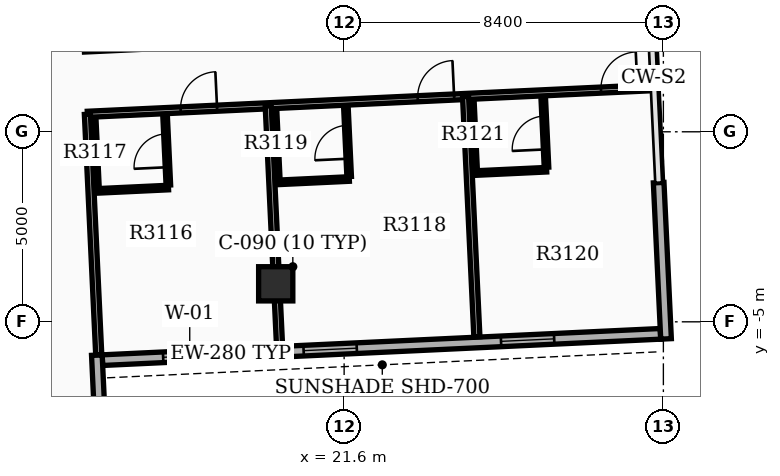
"""IFC4 building model, lengths in metres.
Left out: names, types, materials, properties, quantities, classifications, styles, units other than length and angle.
Written with IfcOpenShell. Run it as: python <this file> out.ifc"""

import sys

from ifc_helpers import new_model, si_unit, direction, frame, frame_2d, origin, origin_2d, place, context, subcontext, project, spatial, rectangle, extrude, element, fill, save


model = new_model("IFC4")
c1 = context("Model", 3, precision=1e-05, world=origin(), true_north=direction((0.0, 1.0)))
c2 = subcontext(c1, "Body", "Model", "MODEL_VIEW")
j1 = project(units=[si_unit("LENGTHUNIT", "METRE"), si_unit("PLANEANGLEUNIT", "RADIAN")], contexts=[c1])
p1 = place(None, origin())
s1 = spatial("IfcSite", under=j1, at=p1, CompositionType="ELEMENT")
p2 = place(p1, origin())
s2 = spatial("IfcBuilding", under=s1, at=p2, CompositionType="ELEMENT")
p3 = place(p2, frame((0.0, 0.0, 196.8)))
s3 = spatial("IfcBuildingStorey", under=s2, at=p3, CompositionType="ELEMENT", Elevation=196.8)
p4 = place(p3, frame((19.8, -4.0, 0.0), z_axis=(0.0, 0.0, 1.0), x_axis=(1.0, 0.0, 0.0)))
e1 = element("IfcColumn", 1, at=p4, inside=s3, PredefinedType="COLUMN", context=c2, shape_type="SweptSolid", body=[
    extrude(rectangle(XDim=0.9, YDim=0.9, at=origin_2d()), origin(), (0.0, 0.0, 1.0), 4.5),
])
p5 = place(p3, frame((15.24, -6.009, 0.0), z_axis=(0.0, 0.0, 1.0), x_axis=(0.998890124275, 0.047101163748, 0.0)))
e2 = element("IfcWall", 2, at=p5, inside=s3, PredefinedType="STANDARD", context=c2, shape_type="SweptSolid", body=[
    extrude(rectangle(XDim=14.7, YDim=0.28, at=frame_2d((7.35, 0.0))), origin(), (0.0, 0.0, 1.0), 3.38),
])
p6 = place(p5, frame((1.6, 0.0, 0.8)))
e3 = element("IfcOpeningElement", 3, at=p6, cuts=e2, PredefinedType="OPENING", context=c2, shape_type="SweptSolid", body=[
    extrude(rectangle(XDim=1.4, YDim=1.6, at=frame_2d((0.7, 0.8))), frame((0.0, 0.15, 0.0), z_axis=(0.0, -1.0, 0.0), x_axis=(1.0, 0.0, 0.0)), (0.0, 0.0, 1.0), 0.3),
])
p7 = place(p5, frame((5.3, 0.0, 0.8)))
e4 = element("IfcOpeningElement", 4, at=p7, cuts=e2, PredefinedType="OPENING", context=c2, shape_type="SweptSolid", body=[
    extrude(rectangle(XDim=1.4, YDim=1.6, at=frame_2d((0.7, 0.8))), frame((0.0, 0.15, 0.0), z_axis=(0.0, -1.0, 0.0), x_axis=(1.0, 0.0, 0.0)), (0.0, 0.0, 1.0), 0.3),
])
p8 = place(p5, frame((10.5, 0.0, 0.8)))
e5 = element("IfcOpeningElement", 5, at=p8, cuts=e2, PredefinedType="OPENING", context=c2, shape_type="SweptSolid", body=[
    extrude(rectangle(XDim=1.4, YDim=1.6, at=frame_2d((0.7, 0.8))), frame((0.0, 0.15, 0.0), z_axis=(0.0, -1.0, 0.0), x_axis=(1.0, 0.0, 0.0)), (0.0, 0.0, 1.0), 0.3),
])
p9 = place(p3, frame((30.07, -5.45, 0.0), z_axis=(0.0, 0.0, 1.0), x_axis=(-0.047094531617, 0.998890436981, 0.0)))
e6 = element("IfcWall", 6, at=p9, inside=s3, PredefinedType="STANDARD", context=c2, shape_type="SweptSolid", body=[
    extrude(rectangle(XDim=4.116, YDim=0.28, at=frame_2d((2.058, 0.0))), origin(), (0.0, 0.0, 1.0), 3.38),
])
p10 = place(p3, frame((15.094, -5.875, 0.0), z_axis=(0.0, 0.0, 1.0), x_axis=(0.04712043756, -0.998889215261, 0.0)))
e7 = element("IfcWall", 7, at=p10, inside=s3, PredefinedType="STANDARD", context=c2, shape_type="SweptSolid", body=[
    extrude(rectangle(XDim=6.86, YDim=0.28, at=frame_2d((3.43, 0.0))), origin(), (0.0, 0.0, 1.0), 3.38),
])
p11 = place(p3, frame((14.845, 0.46, 0.0), z_axis=(0.0, 0.0, 1.0), x_axis=(0.998889676925, 0.047110649891, 0.0)))
e8 = element("IfcWall", 8, at=p11, inside=s3, PredefinedType="PARTITIONING", context=c2, shape_type="SweptSolid", body=[
    extrude(rectangle(XDim=14.93, YDim=0.16, at=frame_2d((7.465, 0.0))), origin(), (0.0, 0.0, 1.0), 3.37),
])
p12 = place(p11, frame((2.456, 0.0, 0.0)))
e9 = element("IfcOpeningElement", 9, at=p12, cuts=e8, PredefinedType="OPENING", context=c2, shape_type="SweptSolid", body=[
    extrude(rectangle(XDim=0.96, YDim=2.15, at=frame_2d((0.48, 1.075))), frame((0.0, 0.09, 0.0), z_axis=(0.0, -1.0, 0.0), x_axis=(1.0, 0.0, 0.0)), (0.0, 0.0, 1.0), 0.18),
])
p13 = place(p11, frame((8.701, 0.0, 0.0)))
e10 = element("IfcOpeningElement", 10, at=p13, cuts=e8, PredefinedType="OPENING", context=c2, shape_type="SweptSolid", body=[
    extrude(rectangle(XDim=0.96, YDim=2.15, at=frame_2d((0.48, 1.075))), frame((0.0, 0.09, 0.0), z_axis=(0.0, -1.0, 0.0), x_axis=(1.0, 0.0, 0.0)), (0.0, 0.0, 1.0), 0.18),
])
p14 = place(p11, frame((13.53, 0.0, 0.0)))
e11 = element("IfcOpeningElement", 11, at=p14, cuts=e8, PredefinedType="OPENING", context=c2, shape_type="SweptSolid", body=[
    extrude(rectangle(XDim=0.96, YDim=2.15, at=frame_2d((0.48, 1.075))), frame((0.0, 0.09, 0.0), z_axis=(0.0, -1.0, 0.0), x_axis=(1.0, 0.0, 0.0)), (0.0, 0.0, 1.0), 0.18),
])
for number, where, z_axis, x_axis in (
    (12, (14.845, 0.46, 0.0), (0.0, 0.0, 1.0), (0.047, -0.999, 0.0)),
    (13, (19.603, 0.684, 0.0), (0.0, 0.0, 1.0), (0.047, -0.999, 0.0)),
):
    element("IfcWall", number, at=place(p3, frame(where, z_axis=z_axis, x_axis=x_axis)), inside=s3, PredefinedType="PARTITIONING", context=c2, shape_type="SweptSolid", body=[
        extrude(rectangle(XDim=6.332, YDim=0.16, at=frame_2d((3.166, 0.0))), origin(), (0.0, 0.0, 1.0), 3.37),
    ])
p15 = place(p3, frame((16.975, -1.402, 0.0), z_axis=(0.0, 0.0, 1.0), x_axis=(-0.047087116047, 0.998890786574, 0.0)))
e14 = element("IfcWall", 14, at=p15, inside=s3, PredefinedType="PARTITIONING", context=c2, shape_type="SweptSolid", body=[
    extrude(rectangle(XDim=1.82, YDim=0.12, at=frame_2d((0.91, 0.0))), origin(), (0.0, 0.0, 1.0), 3.37),
])
p16 = place(p15, frame((0.47, 0.0, 0.0)))
e15 = element("IfcOpeningElement", 15, at=p16, cuts=e14, PredefinedType="OPENING", context=c2, shape_type="SweptSolid", body=[
    extrude(rectangle(XDim=0.88, YDim=2.1, at=frame_2d((0.44, 1.05))), frame((0.0, 0.07, 0.0), z_axis=(0.0, -1.0, 0.0), x_axis=(1.0, 0.0, 0.0)), (0.0, 0.0, 1.0), 0.14),
])
p17 = place(p3, frame((15.097, -1.49, 0.0), z_axis=(0.0, 0.0, 1.0), x_axis=(-0.047087116047, 0.998890786574, 0.0)))
e16 = element("IfcWall", 16, at=p17, inside=s3, PredefinedType="PARTITIONING", context=c2, shape_type="SweptSolid", body=[
    extrude(rectangle(XDim=1.82, YDim=0.12, at=frame_2d((0.91, 0.0))), origin(), (0.0, 0.0, 1.0), 3.37),
])
p18 = place(p3, frame((15.1, -1.555, 0.0), z_axis=(0.0, 0.0, 1.0), x_axis=(0.998888030748, 0.047145540913, 0.0)))
e17 = element("IfcWall", 17, at=p18, inside=s3, PredefinedType="PARTITIONING", context=c2, shape_type="SweptSolid", body=[
    extrude(rectangle(XDim=1.88, YDim=0.12, at=frame_2d((0.94, 0.0))), origin(), (0.0, 0.0, 1.0), 3.37),
])
p19 = place(p3, frame((24.795, 0.929, 0.0), z_axis=(0.0, 0.0, 1.0), x_axis=(0.047077862468, -0.998891222739, 0.0)))
e18 = element("IfcWall", 18, at=p19, inside=s3, PredefinedType="PARTITIONING", context=c2, shape_type="SweptSolid", body=[
    extrude(rectangle(XDim=6.332, YDim=0.16, at=frame_2d((3.166, 0.0))), origin(), (0.0, 0.0, 1.0), 3.37),
])
p20 = place(p3, frame((21.733, -1.177, 0.0), z_axis=(0.0, 0.0, 1.0), x_axis=(-0.047087116047, 0.998890786574, 0.0)))
e19 = element("IfcWall", 19, at=p20, inside=s3, PredefinedType="PARTITIONING", context=c2, shape_type="SweptSolid", body=[
    extrude(rectangle(XDim=1.82, YDim=0.12, at=frame_2d((0.91, 0.0))), origin(), (0.0, 0.0, 1.0), 3.37),
])
p21 = place(p20, frame((0.47, 0.0, 0.0)))
e20 = element("IfcOpeningElement", 20, at=p21, cuts=e19, PredefinedType="OPENING", context=c2, shape_type="SweptSolid", body=[
    extrude(rectangle(XDim=0.88, YDim=2.1, at=frame_2d((0.44, 1.05))), frame((0.0, 0.07, 0.0), z_axis=(0.0, -1.0, 0.0), x_axis=(1.0, 0.0, 0.0)), (0.0, 0.0, 1.0), 0.14),
])
p22 = place(p3, frame((19.855, -1.266, 0.0), z_axis=(0.0, 0.0, 1.0), x_axis=(-0.047214641863, 0.998884766924, 0.0)))
e21 = element("IfcWall", 21, at=p22, inside=s3, PredefinedType="PARTITIONING", context=c2, shape_type="SweptSolid", body=[
    extrude(rectangle(XDim=1.82, YDim=0.12, at=frame_2d((0.91, 0.0))), origin(), (0.0, 0.0, 1.0), 3.37),
])
p23 = place(p3, frame((19.858, -1.331, 0.0), z_axis=(0.0, 0.0, 1.0), x_axis=(0.998888319371, 0.047139425368, 0.0)))
e22 = element("IfcWall", 22, at=p23, inside=s3, PredefinedType="PARTITIONING", context=c2, shape_type="SweptSolid", body=[
    extrude(rectangle(XDim=1.88, YDim=0.12, at=frame_2d((0.94, 0.0))), origin(), (0.0, 0.0, 1.0), 3.37),
])
p24 = place(p3, frame((26.925, -0.933, 0.0), z_axis=(0.0, 0.0, 1.0), x_axis=(-0.047087116047, 0.998890786574, 0.0)))
e23 = element("IfcWall", 23, at=p24, inside=s3, PredefinedType="PARTITIONING", context=c2, shape_type="SweptSolid", body=[
    extrude(rectangle(XDim=1.82, YDim=0.12, at=frame_2d((0.91, 0.0))), origin(), (0.0, 0.0, 1.0), 3.37),
])
p25 = place(p24, frame((0.47, 0.0, 0.0)))
e24 = element("IfcOpeningElement", 24, at=p25, cuts=e23, PredefinedType="OPENING", context=c2, shape_type="SweptSolid", body=[
    extrude(rectangle(XDim=0.88, YDim=2.1, at=frame_2d((0.44, 1.05))), frame((0.0, 0.07, 0.0), z_axis=(0.0, -1.0, 0.0), x_axis=(1.0, 0.0, 0.0)), (0.0, 0.0, 1.0), 0.14),
])
p26 = place(p3, frame((25.047, -1.021, 0.0), z_axis=(0.0, 0.0, 1.0), x_axis=(-0.047087116047, 0.998890786574, 0.0)))
e25 = element("IfcWall", 25, at=p26, inside=s3, PredefinedType="PARTITIONING", context=c2, shape_type="SweptSolid", body=[
    extrude(rectangle(XDim=1.82, YDim=0.12, at=frame_2d((0.91, 0.0))), origin(), (0.0, 0.0, 1.0), 3.37),
])
p27 = place(p3, frame((25.05, -1.086, 0.0), z_axis=(0.0, 0.0, 1.0), x_axis=(0.998888319371, 0.047139425368, 0.0)))
e26 = element("IfcWall", 26, at=p27, inside=s3, PredefinedType="PARTITIONING", context=c2, shape_type="SweptSolid", body=[
    extrude(rectangle(XDim=1.88, YDim=0.12, at=frame_2d((0.94, 0.0))), origin(), (0.0, 0.0, 1.0), 3.37),
])
p28 = place(p6, origin())
e27 = element("IfcWindow", 27, at=p28, inside=s3, PartitioningType="SINGLE_PANEL", PredefinedType="WINDOW", context=c2, shape_type="SweptSolid", body=[
    extrude(rectangle(XDim=1.4, YDim=1.6, at=frame_2d((0.7, 0.8))), frame((0.0, 0.03, 0.0), z_axis=(0.0, -1.0, 0.0), x_axis=(1.0, 0.0, 0.0)), (0.0, 0.0, 1.0), 0.06),
])
fill(e3, e27)
p29 = place(p7, origin())
e28 = element("IfcWindow", 28, at=p29, inside=s3, PartitioningType="SINGLE_PANEL", PredefinedType="WINDOW", context=c2, shape_type="SweptSolid", body=[
    extrude(rectangle(XDim=1.4, YDim=1.6, at=frame_2d((0.7, 0.8))), frame((0.0, 0.03, 0.0), z_axis=(0.0, -1.0, 0.0), x_axis=(1.0, 0.0, 0.0)), (0.0, 0.0, 1.0), 0.06),
])
fill(e4, e28)
p30 = place(p8, origin())
e29 = element("IfcWindow", 29, at=p30, inside=s3, PartitioningType="SINGLE_PANEL", PredefinedType="WINDOW", context=c2, shape_type="SweptSolid", body=[
    extrude(rectangle(XDim=1.4, YDim=1.6, at=frame_2d((0.7, 0.8))), frame((0.0, 0.03, 0.0), z_axis=(0.0, -1.0, 0.0), x_axis=(1.0, 0.0, 0.0)), (0.0, 0.0, 1.0), 0.06),
])
fill(e5, e29)
p31 = place(p12, origin())
e30 = element("IfcDoor", 30, at=p31, inside=s3, OperationType="SINGLE_SWING_RIGHT", PredefinedType="DOOR", context=c2, shape_type="SweptSolid", body=[
    extrude(rectangle(XDim=0.96, YDim=2.15, at=frame_2d((0.48, 1.075))), frame((0.0, 0.025, 0.0), z_axis=(0.0, -1.0, 0.0), x_axis=(1.0, 0.0, 0.0)), (0.0, 0.0, 1.0), 0.05),
])
fill(e9, e30)
p32 = place(p16, origin())
e31 = element("IfcDoor", 31, at=p32, inside=s3, OperationType="SINGLE_SWING_LEFT", PredefinedType="DOOR", context=c2, shape_type="SweptSolid", body=[
    extrude(rectangle(XDim=0.88, YDim=2.1, at=frame_2d((0.44, 1.05))), frame((0.0, 0.025, 0.0), z_axis=(0.0, -1.0, 0.0), x_axis=(1.0, 0.0, 0.0)), (0.0, 0.0, 1.0), 0.05),
])
fill(e15, e31)
p33 = place(p13, origin())
e32 = element("IfcDoor", 32, at=p33, inside=s3, OperationType="SINGLE_SWING_RIGHT", PredefinedType="DOOR", context=c2, shape_type="SweptSolid", body=[
    extrude(rectangle(XDim=0.96, YDim=2.15, at=frame_2d((0.48, 1.075))), frame((0.0, 0.025, 0.0), z_axis=(0.0, -1.0, 0.0), x_axis=(1.0, 0.0, 0.0)), (0.0, 0.0, 1.0), 0.05),
])
fill(e10, e32)
p34 = place(p21, origin())
e33 = element("IfcDoor", 33, at=p34, inside=s3, OperationType="SINGLE_SWING_LEFT", PredefinedType="DOOR", context=c2, shape_type="SweptSolid", body=[
    extrude(rectangle(XDim=0.88, YDim=2.1, at=frame_2d((0.44, 1.05))), frame((0.0, 0.025, 0.0), z_axis=(0.0, -1.0, 0.0), x_axis=(1.0, 0.0, 0.0)), (0.0, 0.0, 1.0), 0.05),
])
fill(e20, e33)
p35 = place(p14, origin())
e34 = element("IfcDoor", 34, at=p35, inside=s3, OperationType="SINGLE_SWING_RIGHT", PredefinedType="DOOR", context=c2, shape_type="SweptSolid", body=[
    extrude(rectangle(XDim=0.96, YDim=2.15, at=frame_2d((0.48, 1.075))), frame((0.0, 0.025, 0.0), z_axis=(0.0, -1.0, 0.0), x_axis=(1.0, 0.0, 0.0)), (0.0, 0.0, 1.0), 0.05),
])
fill(e11, e34)
p36 = place(p25, origin())
e35 = element("IfcDoor", 35, at=p36, inside=s3, OperationType="SINGLE_SWING_LEFT", PredefinedType="DOOR", context=c2, shape_type="SweptSolid", body=[
    extrude(rectangle(XDim=0.88, YDim=2.1, at=frame_2d((0.44, 1.05))), frame((0.0, 0.025, 0.0), z_axis=(0.0, -1.0, 0.0), x_axis=(1.0, 0.0, 0.0)), (0.0, 0.0, 1.0), 0.05),
])
fill(e24, e35)
save(model, sys.argv[1])
